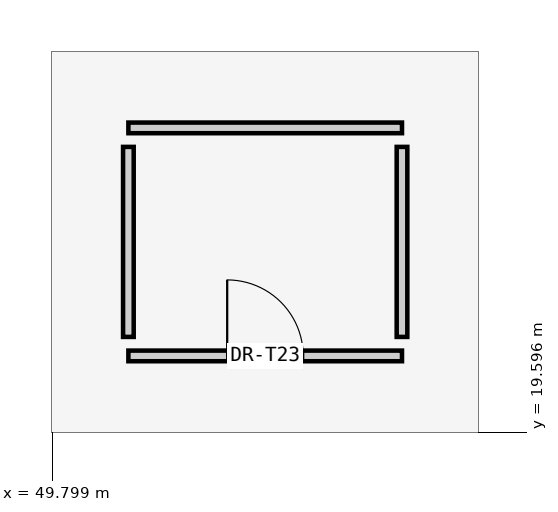
"""IFC4 building model, lengths in metres.
Left out: names, types, materials, properties, quantities, classifications, styles, units other than length and angle.
Written with IfcOpenShell. Run it as: python <this file> out.ifc"""

import sys

from ifc_helpers import new_model, si_unit, direction, frame, frame_2d, origin, place, context, subcontext, project, spatial, rectangle, extrude, element, fill, save


model = new_model("IFC4")
c1 = context("Model", 3, precision=1e-05, world=origin(), true_north=direction((0.0, 1.0)))
c2 = subcontext(c1, "Body", "Model", "MODEL_VIEW")
j1 = project(units=[si_unit("LENGTHUNIT", "METRE"), si_unit("PLANEANGLEUNIT", "RADIAN")], contexts=[c1])
p1 = place(None, origin())
s1 = spatial("IfcSite", under=j1, at=p1, CompositionType="ELEMENT")
p2 = place(p1, origin())
s2 = spatial("IfcBuilding", under=s1, at=p2, CompositionType="ELEMENT")
p3 = place(p2, frame((0.0, 0.0, 5.4)))
s3 = spatial("IfcBuildingStorey", under=s2, at=p3, CompositionType="ELEMENT", Elevation=5.4)
p4 = place(p3, frame((50.8, 20.6, 0.0), z_axis=(0.0, 0.0, 1.0), x_axis=(1.0, 0.0, 0.0)))
e1 = element("IfcWall", 1, at=p4, inside=s3, PredefinedType="PARTITIONING", context=c2, shape_type="SweptSolid", body=[
    extrude(rectangle(XDim=3.6, YDim=0.14, at=frame_2d((1.8, 0.0))), origin(), (0.0, 0.0, 1.0), 4.32),
])
p5 = place(p4, frame((1.3, 0.0, 0.0)))
e2 = element("IfcOpeningElement", 2, at=p5, cuts=e1, PredefinedType="OPENING", context=c2, shape_type="SweptSolid", body=[
    extrude(rectangle(XDim=1.0, YDim=2.15, at=frame_2d((0.5, 1.075))), frame((0.0, 0.08, 0.0), z_axis=(0.0, -1.0, 0.0), x_axis=(1.0, 0.0, 0.0)), (0.0, 0.0, 1.0), 0.16),
])
p6 = place(p3, frame((50.8, 23.6, 0.0), z_axis=(0.0, 0.0, 1.0), x_axis=(1.0, 0.0, 0.0)))
e3 = element("IfcWall", 3, at=p6, inside=s3, PredefinedType="PARTITIONING", context=c2, shape_type="SweptSolid", body=[
    extrude(rectangle(XDim=3.6, YDim=0.14, at=frame_2d((1.8, 0.0))), origin(), (0.0, 0.0, 1.0), 4.32),
])
for number, where, z_axis, x_axis in (
    (4, (50.8, 20.85, 0.0), (0.0, 0.0, 1.0), (0.0, 1.0, 0.0)),
    (5, (54.4, 20.85, 0.0), (0.0, 0.0, 1.0), (0.0, 1.0, 0.0)),
):
    element("IfcWall", number, at=place(p3, frame(where, z_axis=z_axis, x_axis=x_axis)), inside=s3, PredefinedType="PARTITIONING", context=c2, shape_type="SweptSolid", body=[
        extrude(rectangle(XDim=2.5, YDim=0.14, at=frame_2d((1.25, 0.0))), origin(), (0.0, 0.0, 1.0), 4.32),
    ])
p7 = place(p5, origin())
e6 = element("IfcDoor", 6, at=p7, inside=s3, OperationType="SINGLE_SWING_LEFT", PredefinedType="DOOR", context=c2, shape_type="SweptSolid", body=[
    extrude(rectangle(XDim=1.0, YDim=2.15, at=frame_2d((0.5, 1.075))), frame((0.0, 0.025, 0.0), z_axis=(0.0, -1.0, 0.0), x_axis=(1.0, 0.0, 0.0)), (0.0, 0.0, 1.0), 0.05),
])
fill(e2, e6)
save(model, sys.argv[1])
